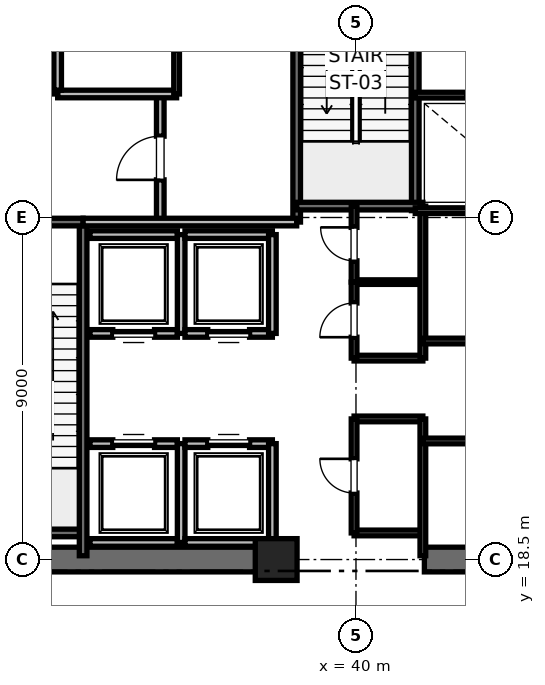
"""IFC4 building model, lengths in metres.
Left out: names, types, materials, properties, quantities, classifications, styles, units other than length and angle.
Written with IfcOpenShell. Run it as: python <this file> out.ifc"""

import sys

from ifc_helpers import new_model, si_unit, direction, frame, frame_2d, origin, origin_2d, place, context, subcontext, project, spatial, rectangle, extrude, element, fill, save


model = new_model("IFC4")
c1 = context("Model", 3, precision=1e-05, world=origin(), true_north=direction((0.0, 1.0)))
c2 = subcontext(c1, "Body", "Model", "MODEL_VIEW")
j1 = project(units=[si_unit("LENGTHUNIT", "METRE"), si_unit("PLANEANGLEUNIT", "RADIAN")], contexts=[c1])
p1 = place(None, origin())
s1 = spatial("IfcSite", under=j1, at=p1, CompositionType="ELEMENT")
p2 = place(p1, origin())
s2 = spatial("IfcBuilding", under=s1, at=p2, CompositionType="ELEMENT")
p3 = place(p2, origin())
s3 = spatial("IfcBuildingStorey", under=s2, at=p3, CompositionType="ELEMENT", Elevation=0.0)
p4 = place(p3, frame((37.9, 18.5, 0.0), z_axis=(0.0, 0.0, 1.0), x_axis=(1.0, 0.0, 0.0)))
e1 = element("IfcColumn", 1, at=p4, inside=s3, PredefinedType="PILASTER", context=c2, shape_type="SweptSolid", body=[
    extrude(rectangle(XDim=1.1, YDim=1.1, at=origin_2d()), origin(), (0.0, 0.0, 1.0), 6.0),
])
for number, where, z_axis, x_axis in (
    (2, (29.0, 18.5, 0.0), (0.0, 0.0, 1.0), (1.0, 0.0, 0.0)),
    (3, (41.8, 18.5, 0.0), (0.0, 0.0, 1.0), (1.0, 0.0, 0.0)),
):
    element("IfcWall", number, at=place(p3, frame(where, z_axis=z_axis, x_axis=x_axis)), inside=s3, PredefinedType="SHEAR", context=c2, shape_type="SweptSolid", body=[
        extrude(rectangle(XDim=9.2, YDim=0.65, at=frame_2d((4.6, 0.0))), origin(), (0.0, 0.0, 1.0), 5.72),
    ])
p5 = place(p3, frame((29.7, 19.2, 0.0), z_axis=(0.0, 0.0, 1.0), x_axis=(1.0, 0.0, 0.0)))
e4 = element("IfcWall", 4, at=p5, inside=s3, PredefinedType="SOLIDWALL", context=c2, shape_type="SweptSolid", body=[
    extrude(rectangle(XDim=3.12, YDim=0.2, at=frame_2d((1.56, 0.0))), origin(), (0.0, 0.0, 1.0), 5.72),
])
p6 = place(p3, frame((32.82, 18.6, 0.0), z_axis=(0.0, 0.0, 1.0), x_axis=(0.0, 1.0, 0.0)))
e5 = element("IfcWall", 5, at=p6, inside=s3, PredefinedType="SOLIDWALL", context=c2, shape_type="SweptSolid", body=[
    extrude(rectangle(XDim=8.78, YDim=0.2, at=frame_2d((4.39, 0.0))), origin(), (0.0, 0.0, 1.0), 5.72),
])
p7 = place(p3, frame((29.7, 27.38, 0.0), z_axis=(0.0, 0.0, 1.0), x_axis=(1.0, 0.0, 0.0)))
e6 = element("IfcWall", 6, at=p7, inside=s3, PredefinedType="SOLIDWALL", context=c2, shape_type="SweptSolid", body=[
    extrude(rectangle(XDim=3.12, YDim=0.2, at=frame_2d((1.56, 0.0))), origin(), (0.0, 0.0, 1.0), 5.72),
])
p8 = place(p7, frame((1.01, 0.0, 0.0)))
e7 = element("IfcOpeningElement", 7, at=p8, cuts=e6, PredefinedType="OPENING", context=c2, shape_type="SweptSolid", body=[
    extrude(rectangle(XDim=1.1, YDim=2.15, at=frame_2d((0.55, 1.075))), frame((0.0, 0.1, 0.0), z_axis=(0.0, -1.0, 0.0), x_axis=(1.0, 0.0, 0.0)), (0.0, 0.0, 1.0), 0.2),
])
p9 = place(p3, frame((38.44, 27.38, 0.0), z_axis=(0.0, 0.0, 1.0), x_axis=(0.0, 1.0, 0.0)))
e8 = element("IfcWall", 8, at=p9, inside=s3, PredefinedType="SOLIDWALL", context=c2, shape_type="SweptSolid", body=[
    extrude(rectangle(XDim=8.87, YDim=0.2, at=frame_2d((4.435, 0.0))), origin(), (0.0, 0.0, 1.0), 5.72),
])
p10 = place(p3, frame((41.56, 27.68, 0.0), z_axis=(0.0, 0.0, 1.0), x_axis=(0.0, 1.0, 0.0)))
e9 = element("IfcWall", 9, at=p10, inside=s3, PredefinedType="SOLIDWALL", context=c2, shape_type="SweptSolid", body=[
    extrude(rectangle(XDim=8.57, YDim=0.2, at=frame_2d((4.285, 0.0))), origin(), (0.0, 0.0, 1.0), 5.72),
])
p11 = place(p3, frame((38.44, 27.8, 0.0), z_axis=(0.0, 0.0, 1.0), x_axis=(1.0, 0.0, 0.0)))
e10 = element("IfcWall", 10, at=p11, inside=s3, PredefinedType="SOLIDWALL", context=c2, shape_type="SweptSolid", body=[
    extrude(rectangle(XDim=3.32, YDim=0.2, at=frame_2d((1.66, 0.0))), origin(), (0.0, 0.0, 1.0), 5.72),
])
p12 = place(p3, frame((34.85, 27.38, 0.0), z_axis=(0.0, 0.0, 1.0), x_axis=(0.0, 1.0, 0.0)))
e11 = element("IfcWall", 11, at=p12, inside=s3, PredefinedType="PARTITIONING", context=c2, shape_type="SweptSolid", body=[
    extrude(rectangle(XDim=3.37, YDim=0.2, at=frame_2d((1.685, 0.0))), origin(), (0.0, 0.0, 1.0), 5.72),
])
p13 = place(p12, frame((1.11, 0.0, 0.0)))
e12 = element("IfcOpeningElement", 12, at=p13, cuts=e11, PredefinedType="OPENING", context=c2, shape_type="SweptSolid", body=[
    extrude(rectangle(XDim=1.15, YDim=2.2, at=frame_2d((0.575, 1.1))), frame((0.0, 0.1, 0.0), z_axis=(0.0, -1.0, 0.0), x_axis=(1.0, 0.0, 0.0)), (0.0, 0.0, 1.0), 0.2),
])
p14 = place(p3, frame((32.82, 27.38, 0.0), z_axis=(0.0, 0.0, 1.0), x_axis=(1.0, 0.0, 0.0)))
e13 = element("IfcWall", 13, at=p14, inside=s3, PredefinedType="PARTITIONING", context=c2, shape_type="SweptSolid", body=[
    extrude(rectangle(XDim=5.62, YDim=0.2, at=frame_2d((2.81, 0.0))), origin(), (0.0, 0.0, 1.0), 5.72),
])
p15 = place(p3, frame((32.15, 30.75, 0.0), z_axis=(0.0, 0.0, 1.0), x_axis=(1.0, 0.0, 0.0)))
e14 = element("IfcWall", 14, at=p15, inside=s3, PredefinedType="PARTITIONING", context=c2, shape_type="SweptSolid", body=[
    extrude(rectangle(XDim=3.13, YDim=0.2, at=frame_2d((1.565, 0.0))), origin(), (0.0, 0.0, 1.0), 5.72),
])
p16 = place(p3, frame((29.55, 30.85, 0.0), z_axis=(0.0, 0.0, 1.0), x_axis=(1.0, 0.0, 0.0)))
e15 = element("IfcWall", 15, at=p16, inside=s3, PredefinedType="SOLIDWALL", context=c2, shape_type="SweptSolid", body=[
    extrude(rectangle(XDim=2.6, YDim=0.2, at=frame_2d((1.3, 0.0))), origin(), (0.0, 0.0, 1.0), 4.5),
])
p17 = place(p16, frame((0.75, 0.0, 0.0)))
e16 = element("IfcOpeningElement", 16, at=p17, cuts=e15, PredefinedType="OPENING", context=c2, shape_type="SweptSolid", body=[
    extrude(rectangle(XDim=1.1, YDim=2.2, at=frame_2d((0.55, 1.1))), frame((0.0, 0.1, 0.0), z_axis=(0.0, -1.0, 0.0), x_axis=(1.0, 0.0, 0.0)), (0.0, 0.0, 1.0), 0.2),
])
p18 = place(p3, frame((32.15, 30.85, 0.0), z_axis=(0.0, 0.0, 1.0), x_axis=(0.0, 1.0, 0.0)))
e17 = element("IfcWall", 17, at=p18, inside=s3, PredefinedType="SOLIDWALL", context=c2, shape_type="SweptSolid", body=[
    extrude(rectangle(XDim=3.0, YDim=0.2, at=frame_2d((1.5, 0.0))), origin(), (0.0, 0.0, 1.0), 5.72),
])
p19 = place(p3, frame((33.0, 18.95, 0.0), z_axis=(0.0, 0.0, 1.0), x_axis=(1.0, 0.0, 0.0)))
e18 = element("IfcWall", 18, at=p19, inside=s3, PredefinedType="SOLIDWALL", context=c2, shape_type="SweptSolid", body=[
    extrude(rectangle(XDim=2.3, YDim=0.2, at=frame_2d((1.15, 0.0))), origin(), (0.0, 0.0, 1.0), 5.72),
])
p20 = place(p3, frame((35.3, 21.55, 0.0), z_axis=(0.0, 0.0, 1.0), x_axis=(-1.0, 0.0, 0.0)))
e19 = element("IfcWall", 19, at=p20, inside=s3, PredefinedType="SOLIDWALL", context=c2, shape_type="SweptSolid", body=[
    extrude(rectangle(XDim=2.3, YDim=0.2, at=frame_2d((1.15, 0.0))), origin(), (0.0, 0.0, 1.0), 5.72),
])
p21 = place(p20, frame((0.6, 0.0, 0.0)))
e20 = element("IfcOpeningElement", 20, at=p21, cuts=e19, PredefinedType="OPENING", context=c2, shape_type="SweptSolid", body=[
    extrude(rectangle(XDim=1.1, YDim=2.2, at=frame_2d((0.55, 1.1))), frame((0.0, 0.1, 0.0), z_axis=(0.0, -1.0, 0.0), x_axis=(1.0, 0.0, 0.0)), (0.0, 0.0, 1.0), 0.2),
])
p22 = place(p3, frame((35.4, 18.95, 0.0), z_axis=(0.0, 0.0, 1.0), x_axis=(0.0, 1.0, 0.0)))
e21 = element("IfcWall", 21, at=p22, inside=s3, PredefinedType="SOLIDWALL", context=c2, shape_type="SweptSolid", body=[
    extrude(rectangle(XDim=2.6, YDim=0.2, at=frame_2d((1.3, 0.0))), origin(), (0.0, 0.0, 1.0), 5.72),
])
p23 = place(p3, frame((35.5, 18.95, 0.0), z_axis=(0.0, 0.0, 1.0), x_axis=(1.0, 0.0, 0.0)))
e22 = element("IfcWall", 22, at=p23, inside=s3, PredefinedType="SOLIDWALL", context=c2, shape_type="SweptSolid", body=[
    extrude(rectangle(XDim=2.3, YDim=0.2, at=frame_2d((1.15, 0.0))), origin(), (0.0, 0.0, 1.0), 4.5),
])
p24 = place(p3, frame((37.8, 21.55, 0.0), z_axis=(0.0, 0.0, 1.0), x_axis=(-1.0, 0.0, 0.0)))
e23 = element("IfcWall", 23, at=p24, inside=s3, PredefinedType="SOLIDWALL", context=c2, shape_type="SweptSolid", body=[
    extrude(rectangle(XDim=2.3, YDim=0.2, at=frame_2d((1.15, 0.0))), origin(), (0.0, 0.0, 1.0), 5.72),
])
p25 = place(p24, frame((0.6, 0.0, 0.0)))
e24 = element("IfcOpeningElement", 24, at=p25, cuts=e23, PredefinedType="OPENING", context=c2, shape_type="SweptSolid", body=[
    extrude(rectangle(XDim=1.1, YDim=2.2, at=frame_2d((0.55, 1.1))), frame((0.0, 0.1, 0.0), z_axis=(0.0, -1.0, 0.0), x_axis=(1.0, 0.0, 0.0)), (0.0, 0.0, 1.0), 0.2),
])
p26 = place(p3, frame((37.8, 18.95, 0.0), z_axis=(0.0, 0.0, 1.0), x_axis=(0.0, 1.0, 0.0)))
e25 = element("IfcWall", 25, at=p26, inside=s3, PredefinedType="SOLIDWALL", context=c2, shape_type="SweptSolid", body=[
    extrude(rectangle(XDim=2.6, YDim=0.2, at=frame_2d((1.3, 0.0))), origin(), (0.0, 0.0, 1.0), 4.5),
])
p27 = place(p3, frame((33.0, 24.45, 0.0), z_axis=(0.0, 0.0, 1.0), x_axis=(1.0, 0.0, 0.0)))
e26 = element("IfcWall", 26, at=p27, inside=s3, PredefinedType="SOLIDWALL", context=c2, shape_type="SweptSolid", body=[
    extrude(rectangle(XDim=2.3, YDim=0.2, at=frame_2d((1.15, 0.0))), origin(), (0.0, 0.0, 1.0), 5.72),
])
p28 = place(p27, frame((0.6, 0.0, 0.0)))
e27 = element("IfcOpeningElement", 27, at=p28, cuts=e26, PredefinedType="OPENING", context=c2, shape_type="SweptSolid", body=[
    extrude(rectangle(XDim=1.1, YDim=2.2, at=frame_2d((0.55, 1.1))), frame((0.0, 0.1, 0.0), z_axis=(0.0, -1.0, 0.0), x_axis=(1.0, 0.0, 0.0)), (0.0, 0.0, 1.0), 0.2),
])
p29 = place(p3, frame((35.3, 27.05, 0.0), z_axis=(0.0, 0.0, 1.0), x_axis=(-1.0, 0.0, 0.0)))
e28 = element("IfcWall", 28, at=p29, inside=s3, PredefinedType="SOLIDWALL", context=c2, shape_type="SweptSolid", body=[
    extrude(rectangle(XDim=2.3, YDim=0.2, at=frame_2d((1.15, 0.0))), origin(), (0.0, 0.0, 1.0), 5.72),
])
p30 = place(p3, frame((35.4, 24.45, 0.0), z_axis=(0.0, 0.0, 1.0), x_axis=(0.0, 1.0, 0.0)))
e29 = element("IfcWall", 29, at=p30, inside=s3, PredefinedType="SOLIDWALL", context=c2, shape_type="SweptSolid", body=[
    extrude(rectangle(XDim=2.6, YDim=0.2, at=frame_2d((1.3, 0.0))), origin(), (0.0, 0.0, 1.0), 5.72),
])
p31 = place(p3, frame((35.5, 24.45, 0.0), z_axis=(0.0, 0.0, 1.0), x_axis=(1.0, 0.0, 0.0)))
e30 = element("IfcWall", 30, at=p31, inside=s3, PredefinedType="SOLIDWALL", context=c2, shape_type="SweptSolid", body=[
    extrude(rectangle(XDim=2.3, YDim=0.2, at=frame_2d((1.15, 0.0))), origin(), (0.0, 0.0, 1.0), 5.72),
])
p32 = place(p31, frame((0.6, 0.0, 0.0)))
e31 = element("IfcOpeningElement", 31, at=p32, cuts=e30, PredefinedType="OPENING", context=c2, shape_type="SweptSolid", body=[
    extrude(rectangle(XDim=1.1, YDim=2.2, at=frame_2d((0.55, 1.1))), frame((0.0, 0.1, 0.0), z_axis=(0.0, -1.0, 0.0), x_axis=(1.0, 0.0, 0.0)), (0.0, 0.0, 1.0), 0.2),
])
p33 = place(p3, frame((37.8, 27.05, 0.0), z_axis=(0.0, 0.0, 1.0), x_axis=(-1.0, 0.0, 0.0)))
e32 = element("IfcWall", 32, at=p33, inside=s3, PredefinedType="SOLIDWALL", context=c2, shape_type="SweptSolid", body=[
    extrude(rectangle(XDim=2.3, YDim=0.2, at=frame_2d((1.15, 0.0))), origin(), (0.0, 0.0, 1.0), 5.72),
])
p34 = place(p3, frame((37.8, 24.45, 0.0), z_axis=(0.0, 0.0, 1.0), x_axis=(0.0, 1.0, 0.0)))
e33 = element("IfcWall", 33, at=p34, inside=s3, PredefinedType="SOLIDWALL", context=c2, shape_type="SweptSolid", body=[
    extrude(rectangle(XDim=2.6, YDim=0.2, at=frame_2d((1.3, 0.0))), origin(), (0.0, 0.0, 1.0), 5.72),
])
for number, where, z_axis, x_axis in (
    (34, (39.95, 19.2, 0.0), (0.0, 0.0, 1.0), (1.0, 0.0, 0.0)),
    (35, (39.95, 22.2, 0.0), (0.0, 0.0, 1.0), (1.0, 0.0, 0.0)),
    (36, (39.95, 23.8, 0.0), (0.0, 0.0, 1.0), (1.0, 0.0, 0.0)),
):
    element("IfcWall", number, at=place(p3, frame(where, z_axis=z_axis, x_axis=x_axis)), inside=s3, PredefinedType="PARTITIONING", context=c2, shape_type="SweptSolid", body=[
        extrude(rectangle(XDim=1.81, YDim=0.15, at=frame_2d((0.905, 0.0))), origin(), (0.0, 0.0, 1.0), 2.85),
    ])
p35 = place(p3, frame((39.95, 25.8, 0.0), z_axis=(0.0, 0.0, 1.0), x_axis=(1.0, 0.0, 0.0)))
e37 = element("IfcWall", 37, at=p35, inside=s3, PredefinedType="PARTITIONING", context=c2, shape_type="SweptSolid", body=[
    extrude(rectangle(XDim=1.81, YDim=0.12, at=frame_2d((0.905, 0.0))), origin(), (0.0, 0.0, 1.0), 2.85),
])
p36 = place(p3, frame((41.76, 18.6, 0.0), z_axis=(0.0, 0.0, 1.0), x_axis=(0.0, 1.0, 0.0)))
e38 = element("IfcWall", 38, at=p36, inside=s3, PredefinedType="PARTITIONING", context=c2, shape_type="SweptSolid", body=[
    extrude(rectangle(XDim=3.6, YDim=0.15, at=frame_2d((1.8, 0.0))), origin(), (0.0, 0.0, 1.0), 2.85),
])
p37 = place(p3, frame((41.76, 23.8, 0.0), z_axis=(0.0, 0.0, 1.0), x_axis=(0.0, 1.0, 0.0)))
e39 = element("IfcWall", 39, at=p37, inside=s3, PredefinedType="PARTITIONING", context=c2, shape_type="SweptSolid", body=[
    extrude(rectangle(XDim=4.0, YDim=0.15, at=frame_2d((2.0, 0.0))), origin(), (0.0, 0.0, 1.0), 2.85),
])
p38 = place(p3, frame((39.95, 19.2, 0.0), z_axis=(0.0, 0.0, 1.0), x_axis=(0.0, 1.0, 0.0)))
e40 = element("IfcWall", 40, at=p38, inside=s3, PredefinedType="PARTITIONING", context=c2, shape_type="SweptSolid", body=[
    extrude(rectangle(XDim=3.0, YDim=0.15, at=frame_2d((1.5, 0.0))), origin(), (0.0, 0.0, 1.0), 2.85),
])
p39 = place(p38, frame((1.05, 0.0, 0.0)))
e41 = element("IfcOpeningElement", 41, at=p39, cuts=e40, PredefinedType="OPENING", context=c2, shape_type="SweptSolid", body=[
    extrude(rectangle(XDim=0.9, YDim=2.1, at=frame_2d((0.45, 1.05))), frame((0.0, 0.075, 0.0), z_axis=(0.0, -1.0, 0.0), x_axis=(1.0, 0.0, 0.0)), (0.0, 0.0, 1.0), 0.15),
])
p40 = place(p3, frame((39.95, 23.8, 0.0), z_axis=(0.0, 0.0, 1.0), x_axis=(0.0, 1.0, 0.0)))
e42 = element("IfcWall", 42, at=p40, inside=s3, PredefinedType="PARTITIONING", context=c2, shape_type="SweptSolid", body=[
    extrude(rectangle(XDim=2.0, YDim=0.15, at=frame_2d((1.0, 0.0))), origin(), (0.0, 0.0, 1.0), 2.85),
])
p41 = place(p40, frame((0.55, 0.0, 0.0)))
e43 = element("IfcOpeningElement", 43, at=p41, cuts=e42, PredefinedType="OPENING", context=c2, shape_type="SweptSolid", body=[
    extrude(rectangle(XDim=0.9, YDim=2.1, at=frame_2d((0.45, 1.05))), frame((0.0, 0.075, 0.0), z_axis=(0.0, -1.0, 0.0), x_axis=(1.0, 0.0, 0.0)), (0.0, 0.0, 1.0), 0.15),
])
p42 = place(p3, frame((39.95, 25.8, 0.0), z_axis=(0.0, 0.0, 1.0), x_axis=(0.0, 1.0, 0.0)))
e44 = element("IfcWall", 44, at=p42, inside=s3, PredefinedType="PARTITIONING", context=c2, shape_type="SweptSolid", body=[
    extrude(rectangle(XDim=2.0, YDim=0.15, at=frame_2d((1.0, 0.0))), origin(), (0.0, 0.0, 1.0), 2.85),
])
p43 = place(p42, frame((0.56, 0.0, 0.0)))
e45 = element("IfcOpeningElement", 45, at=p43, cuts=e44, PredefinedType="OPENING", context=c2, shape_type="SweptSolid", body=[
    extrude(rectangle(XDim=0.88, YDim=2.1, at=frame_2d((0.44, 1.05))), frame((0.0, 0.075, 0.0), z_axis=(0.0, -1.0, 0.0), x_axis=(1.0, 0.0, 0.0)), (0.0, 0.0, 1.0), 0.15),
])
p44 = place(p3, frame((35.28, 30.75, 0.0), z_axis=(0.0, 0.0, 1.0), x_axis=(0.0, 1.0, 0.0)))
e46 = element("IfcWall", 46, at=p44, inside=s3, PredefinedType="PARTITIONING", context=c2, shape_type="SweptSolid", body=[
    extrude(rectangle(XDim=3.2, YDim=0.15, at=frame_2d((1.6, 0.0))), origin(), (0.0, 0.0, 1.0), 2.85),
])
p45 = place(p44, frame((1.15, 0.0, 0.0)))
e47 = element("IfcOpeningElement", 47, at=p45, cuts=e46, PredefinedType="OPENING", context=c2, shape_type="SweptSolid", body=[
    extrude(rectangle(XDim=0.9, YDim=2.1, at=frame_2d((0.45, 1.05))), frame((0.0, 0.075, 0.0), z_axis=(0.0, -1.0, 0.0), x_axis=(1.0, 0.0, 0.0)), (0.0, 0.0, 1.0), 0.15),
])
p46 = place(p3, frame((41.56, 27.68, 0.0), z_axis=(0.0, 0.0, 1.0), x_axis=(1.0, 0.0, 0.0)))
e48 = element("IfcWall", 48, at=p46, inside=s3, PredefinedType="PARTITIONING", context=c2, shape_type="SweptSolid", body=[
    extrude(rectangle(XDim=3.59, YDim=0.15, at=frame_2d((1.795, 0.0))), origin(), (0.0, 0.0, 1.0), 2.85),
])
p47 = place(p3, frame((41.76, 21.62, 0.0), z_axis=(0.0, 0.0, 1.0), x_axis=(1.0, 0.0, 0.0)))
e49 = element("IfcWall", 49, at=p47, inside=s3, PredefinedType="PARTITIONING", context=c2, shape_type="SweptSolid", body=[
    extrude(rectangle(XDim=5.98, YDim=0.15, at=frame_2d((2.99, 0.0))), origin(), (0.0, 0.0, 1.0), 2.85),
])
p48 = place(p47, frame((2.49, 0.0, 0.0)))
e50 = element("IfcOpeningElement", 50, at=p48, cuts=e49, PredefinedType="OPENING", context=c2, shape_type="SweptSolid", body=[
    extrude(rectangle(XDim=1.0, YDim=2.15, at=frame_2d((0.5, 1.075))), frame((0.0, 0.075, 0.0), z_axis=(0.0, -1.0, 0.0), x_axis=(1.0, 0.0, 0.0)), (0.0, 0.0, 1.0), 0.15),
])
p49 = place(p3, frame((41.76, 24.25, 0.0), z_axis=(0.0, 0.0, 1.0), x_axis=(1.0, 0.0, 0.0)))
e51 = element("IfcWall", 51, at=p49, inside=s3, PredefinedType="PARTITIONING", context=c2, shape_type="SweptSolid", body=[
    extrude(rectangle(XDim=3.39, YDim=0.15, at=frame_2d((1.695, 0.0))), origin(), (0.0, 0.0, 1.0), 2.85),
])
p50 = place(p49, frame((1.195, 0.0, 0.0)))
e52 = element("IfcOpeningElement", 52, at=p50, cuts=e51, PredefinedType="OPENING", context=c2, shape_type="SweptSolid", body=[
    extrude(rectangle(XDim=1.0, YDim=2.15, at=frame_2d((0.5, 1.075))), frame((0.0, 0.075, 0.0), z_axis=(0.0, -1.0, 0.0), x_axis=(1.0, 0.0, 0.0)), (0.0, 0.0, 1.0), 0.15),
])
p51 = place(p3, frame((41.56, 30.72, 0.0), z_axis=(0.0, 0.0, 1.0), x_axis=(1.0, 0.0, 0.0)))
e53 = element("IfcWall", 53, at=p51, inside=s3, PredefinedType="PARTITIONING", context=c2, shape_type="SweptSolid", body=[
    extrude(rectangle(XDim=3.59, YDim=0.15, at=frame_2d((1.795, 0.0))), origin(), (0.0, 0.0, 1.0), 2.85),
])
p52 = place(p51, frame((1.355, 0.0, 0.0)))
e54 = element("IfcOpeningElement", 54, at=p52, cuts=e53, PredefinedType="OPENING", context=c2, shape_type="SweptSolid", body=[
    extrude(rectangle(XDim=0.88, YDim=2.1, at=frame_2d((0.44, 1.05))), frame((0.0, 0.075, 0.0), z_axis=(0.0, -1.0, 0.0), x_axis=(1.0, 0.0, 0.0)), (0.0, 0.0, 1.0), 0.15),
])
p53 = place(p13, origin())
e55 = element("IfcDoor", 55, at=p53, inside=s3, OperationType="SINGLE_SWING_LEFT", PredefinedType="DOOR", context=c2, shape_type="SweptSolid", body=[
    extrude(rectangle(XDim=1.15, YDim=2.2, at=frame_2d((0.575, 1.1))), frame((0.0, 0.025, 0.0), z_axis=(0.0, -1.0, 0.0), x_axis=(1.0, 0.0, 0.0)), (0.0, 0.0, 1.0), 0.05),
])
fill(e12, e55)
p54 = place(p21, origin())
e56 = element("IfcDoor", 56, at=p54, inside=s3, OperationType="SLIDING_TO_RIGHT", PredefinedType="DOOR", context=c2, shape_type="SweptSolid", body=[
    extrude(rectangle(XDim=1.1, YDim=2.2, at=frame_2d((0.55, 1.1))), frame((0.0, 0.025, 0.0), z_axis=(0.0, -1.0, 0.0), x_axis=(1.0, 0.0, 0.0)), (0.0, 0.0, 1.0), 0.05),
])
fill(e20, e56)
p55 = place(p25, origin())
e57 = element("IfcDoor", 57, at=p55, inside=s3, OperationType="SLIDING_TO_RIGHT", PredefinedType="DOOR", context=c2, shape_type="SweptSolid", body=[
    extrude(rectangle(XDim=1.1, YDim=2.2, at=frame_2d((0.55, 1.1))), frame((0.0, 0.025, 0.0), z_axis=(0.0, -1.0, 0.0), x_axis=(1.0, 0.0, 0.0)), (0.0, 0.0, 1.0), 0.05),
])
fill(e24, e57)
p56 = place(p28, origin())
e58 = element("IfcDoor", 58, at=p56, inside=s3, OperationType="SLIDING_TO_RIGHT", PredefinedType="DOOR", context=c2, shape_type="SweptSolid", body=[
    extrude(rectangle(XDim=1.1, YDim=2.2, at=frame_2d((0.55, 1.1))), frame((0.0, 0.025, 0.0), z_axis=(0.0, -1.0, 0.0), x_axis=(1.0, 0.0, 0.0)), (0.0, 0.0, 1.0), 0.05),
])
fill(e27, e58)
p57 = place(p32, origin())
e59 = element("IfcDoor", 59, at=p57, inside=s3, OperationType="SLIDING_TO_RIGHT", PredefinedType="DOOR", context=c2, shape_type="SweptSolid", body=[
    extrude(rectangle(XDim=1.1, YDim=2.2, at=frame_2d((0.55, 1.1))), frame((0.0, 0.025, 0.0), z_axis=(0.0, -1.0, 0.0), x_axis=(1.0, 0.0, 0.0)), (0.0, 0.0, 1.0), 0.05),
])
fill(e31, e59)
p58 = place(p39, origin())
e60 = element("IfcDoor", 60, at=p58, inside=s3, OperationType="SINGLE_SWING_RIGHT", PredefinedType="DOOR", context=c2, shape_type="SweptSolid", body=[
    extrude(rectangle(XDim=0.9, YDim=2.1, at=frame_2d((0.45, 1.05))), frame((0.0, 0.025, 0.0), z_axis=(0.0, -1.0, 0.0), x_axis=(1.0, 0.0, 0.0)), (0.0, 0.0, 1.0), 0.05),
])
fill(e41, e60)
p59 = place(p41, origin())
e61 = element("IfcDoor", 61, at=p59, inside=s3, OperationType="SINGLE_SWING_LEFT", PredefinedType="DOOR", context=c2, shape_type="SweptSolid", body=[
    extrude(rectangle(XDim=0.9, YDim=2.1, at=frame_2d((0.45, 1.05))), frame((0.0, 0.025, 0.0), z_axis=(0.0, -1.0, 0.0), x_axis=(1.0, 0.0, 0.0)), (0.0, 0.0, 1.0), 0.05),
])
fill(e43, e61)
p60 = place(p43, origin())
e62 = element("IfcDoor", 62, at=p60, inside=s3, OperationType="SINGLE_SWING_RIGHT", PredefinedType="DOOR", context=c2, shape_type="SweptSolid", body=[
    extrude(rectangle(XDim=0.88, YDim=2.1, at=frame_2d((0.44, 1.05))), frame((0.0, 0.025, 0.0), z_axis=(0.0, -1.0, 0.0), x_axis=(1.0, 0.0, 0.0)), (0.0, 0.0, 1.0), 0.05),
])
fill(e45, e62)
save(model, sys.argv[1])
